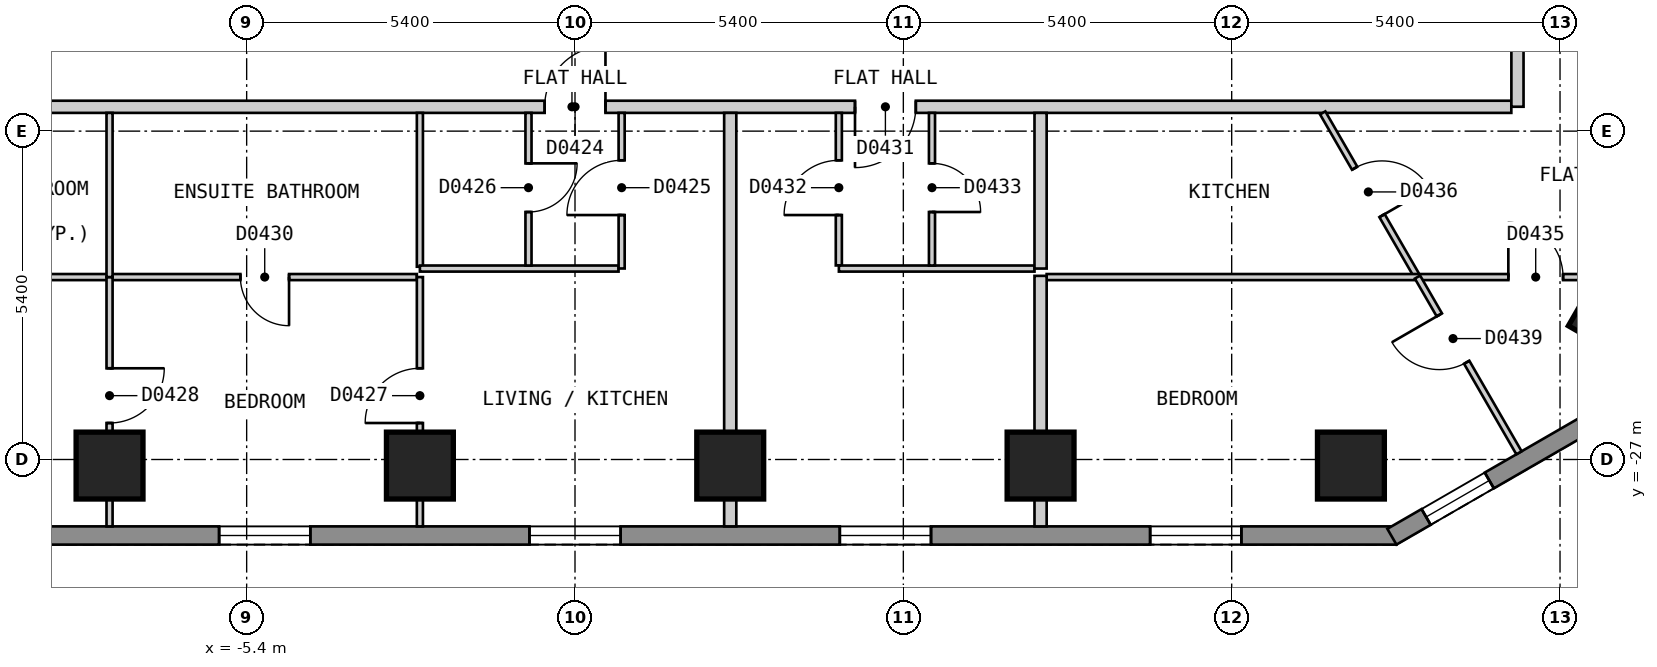
"""IFC4 building model, lengths in metres.
Left out: names, types, materials, properties, quantities, classifications, styles, units other than length and angle.
Written with IfcOpenShell. Run it as: python <this file> out.ifc"""

import sys

from ifc_helpers import new_model, si_unit, direction, frame, frame_2d, origin, origin_2d, place, context, subcontext, project, spatial, polyline, rectangle, outline, extrude, element, fill, save


model = new_model("IFC4")
c1 = context("Model", 3, precision=1e-05, world=origin(), true_north=direction((0.0, 1.0)))
c2 = subcontext(c1, "Body", "Model", "MODEL_VIEW")
j1 = project(units=[si_unit("LENGTHUNIT", "METRE"), si_unit("PLANEANGLEUNIT", "RADIAN")], contexts=[c1])
p1 = place(None, origin())
s1 = spatial("IfcSite", under=j1, at=p1, CompositionType="ELEMENT")
p2 = place(p1, origin())
s2 = spatial("IfcBuilding", under=s1, at=p2, CompositionType="ELEMENT")
p3 = place(p2, frame((0.0, 0.0, 38.4)))
s3 = spatial("IfcBuildingStorey", under=s2, at=p3, CompositionType="ELEMENT", Elevation=38.4)
for number, where, z_axis, x_axis in (
    (1, (-7.655, -27.1, 0.0), (0.0, 0.0, 1.0), (1.0, 0.0, 0.0)),
    (2, (-2.551, -27.1, 0.0), (0.0, 0.0, 1.0), (1.0, 0.0, 0.0)),
    (3, (2.553, -27.1, 0.0), (0.0, 0.0, 1.0), (1.0, 0.0, 0.0)),
    (4, (7.657, -27.1, 0.0), (0.0, 0.0, 1.0), (1.0, 0.0, 0.0)),
    (5, (12.761, -27.1, 0.0), (0.0, 0.0, 1.0), (1.0, 0.0, 0.0)),
    (6, (17.09, -24.6, 0.0), (0.0, 0.0, 1.0), (0.5, 0.866, 0.0)),
):
    element("IfcColumn", number, at=place(p3, frame(where, z_axis=z_axis, x_axis=x_axis)), inside=s3, PredefinedType="COLUMN", context=c2, shape_type="SweptSolid", body=[
        extrude(rectangle(XDim=1.1, YDim=1.1, at=origin_2d()), origin(), (0.0, 0.0, 1.0), 3.0),
    ])
p4 = place(p3, frame((-13.51, -28.25, 0.0), z_axis=(0.0, 0.0, 1.0), x_axis=(1.0, 0.0, 0.0)))
e7 = element("IfcWall", 7, at=p4, inside=s3, PredefinedType="SOLIDWALL", context=c2, shape_type="SweptSolid", body=[
    extrude(outline(polyline([(0.0, -0.15), (27.02, -0.15), (26.94, 0.15), (0.08, 0.15), (0.0, -0.15)])), origin(), (0.0, 0.0, 1.0), 2.7),
])
p5 = place(p4, frame((2.553, 0.0, 0.15)))
e8 = element("IfcOpeningElement", 8, at=p5, cuts=e7, PredefinedType="OPENING", context=c2, shape_type="SweptSolid", body=[
    extrude(rectangle(XDim=1.5, YDim=2.1, at=frame_2d((0.75, 1.05))), frame((0.0, 0.16, 0.0), z_axis=(0.0, -1.0, 0.0), x_axis=(1.0, 0.0, 0.0)), (0.0, 0.0, 1.0), 0.32),
])
p6 = place(p4, frame((7.657, 0.0, 0.15)))
e9 = element("IfcOpeningElement", 9, at=p6, cuts=e7, PredefinedType="OPENING", context=c2, shape_type="SweptSolid", body=[
    extrude(rectangle(XDim=1.5, YDim=2.1, at=frame_2d((0.75, 1.05))), frame((0.0, 0.16, 0.0), z_axis=(0.0, -1.0, 0.0), x_axis=(1.0, 0.0, 0.0)), (0.0, 0.0, 1.0), 0.32),
])
p7 = place(p4, frame((12.761, 0.0, 0.15)))
e10 = element("IfcOpeningElement", 10, at=p7, cuts=e7, PredefinedType="OPENING", context=c2, shape_type="SweptSolid", body=[
    extrude(rectangle(XDim=1.5, YDim=2.1, at=frame_2d((0.75, 1.05))), frame((0.0, 0.16, 0.0), z_axis=(0.0, -1.0, 0.0), x_axis=(1.0, 0.0, 0.0)), (0.0, 0.0, 1.0), 0.32),
])
p8 = place(p4, frame((17.865, 0.0, 0.15)))
e11 = element("IfcOpeningElement", 11, at=p8, cuts=e7, PredefinedType="OPENING", context=c2, shape_type="SweptSolid", body=[
    extrude(rectangle(XDim=1.5, YDim=2.1, at=frame_2d((0.75, 1.05))), frame((0.0, 0.16, 0.0), z_axis=(0.0, -1.0, 0.0), x_axis=(1.0, 0.0, 0.0)), (0.0, 0.0, 1.0), 0.32),
])
p9 = place(p4, frame((22.969, 0.0, 0.15)))
e12 = element("IfcOpeningElement", 12, at=p9, cuts=e7, PredefinedType="OPENING", context=c2, shape_type="SweptSolid", body=[
    extrude(rectangle(XDim=1.5, YDim=2.1, at=frame_2d((0.75, 1.05))), frame((0.0, 0.16, 0.0), z_axis=(0.0, -1.0, 0.0), x_axis=(1.0, 0.0, 0.0)), (0.0, 0.0, 1.0), 0.32),
])
p10 = place(p3, frame((13.435, -28.27, 0.0), z_axis=(0.0, 0.0, 1.0), x_axis=(0.866010750942, 0.50002537861, 0.0)))
e13 = element("IfcWall", 13, at=p10, inside=s3, PredefinedType="SOLIDWALL", context=c2, shape_type="SweptSolid", body=[
    extrude(outline(polyline([(0.0, -0.15), (5.0, -0.15), (4.919, 0.15), (0.08, 0.15), (0.0, -0.15)])), origin(), (0.0, 0.0, 1.0), 2.7),
])
p11 = place(p10, frame((0.65, 0.0, 0.15)))
e14 = element("IfcOpeningElement", 14, at=p11, cuts=e13, PredefinedType="OPENING", context=c2, shape_type="SweptSolid", body=[
    extrude(rectangle(XDim=1.2, YDim=2.1, at=frame_2d((0.6, 1.05))), frame((0.0, 0.16, 0.0), z_axis=(0.0, -1.0, 0.0), x_axis=(1.0, 0.0, 0.0)), (0.0, 0.0, 1.0), 0.32),
])
p12 = place(p3, frame((-15.499, -21.2, 0.0), z_axis=(0.0, 0.0, 1.0), x_axis=(1.0, 0.0, 0.0)))
e15 = element("IfcWall", 15, at=p12, inside=s3, PredefinedType="PARTITIONING", context=c2, shape_type="SweptSolid", body=[
    extrude(rectangle(XDim=30.898, YDim=0.2, at=frame_2d((15.449, 0.0))), origin(), (0.0, 0.0, 1.0), 2.7),
])
p13 = place(p12, frame((15.0, 0.0, 0.0)))
e16 = element("IfcOpeningElement", 16, at=p13, cuts=e15, PredefinedType="OPENING", context=c2, shape_type="SweptSolid", body=[
    extrude(rectangle(XDim=1.0, YDim=2.1, at=frame_2d((0.5, 1.05))), frame((0.0, 0.11, 0.0), z_axis=(0.0, -1.0, 0.0), x_axis=(1.0, 0.0, 0.0)), (0.0, 0.0, 1.0), 0.22),
])
p14 = place(p12, frame((20.104, 0.0, 0.0)))
e17 = element("IfcOpeningElement", 17, at=p14, cuts=e15, PredefinedType="OPENING", context=c2, shape_type="SweptSolid", body=[
    extrude(rectangle(XDim=1.0, YDim=2.1, at=frame_2d((0.5, 1.05))), frame((0.0, 0.11, 0.0), z_axis=(0.0, -1.0, 0.0), x_axis=(1.0, 0.0, 0.0)), (0.0, 0.0, 1.0), 0.22),
])
p15 = place(p3, frame((15.5, -21.199, 0.0), z_axis=(0.0, 0.0, 1.0), x_axis=(0.0, 1.0, 0.0)))
e18 = element("IfcWall", 18, at=p15, inside=s3, PredefinedType="PARTITIONING", context=c2, shape_type="SweptSolid", body=[
    extrude(rectangle(XDim=7.575, YDim=0.2, at=frame_2d((3.788, 0.0))), origin(), (0.0, 0.0, 1.0), 2.7),
])
p16 = place(p15, frame((1.188, 0.0, 0.0)))
e19 = element("IfcOpeningElement", 19, at=p16, cuts=e18, PredefinedType="OPENING", context=c2, shape_type="SweptSolid", body=[
    extrude(rectangle(XDim=1.0, YDim=2.1, at=frame_2d((0.5, 1.05))), frame((0.0, 0.11, 0.0), z_axis=(0.0, -1.0, 0.0), x_axis=(1.0, 0.0, 0.0)), (0.0, 0.0, 1.0), 0.22),
])
p17 = place(p3, frame((12.297, -21.3, 0.0), z_axis=(0.0, 0.0, 1.0), x_axis=(0.500004896655, -0.866022576681, 0.0)))
e20 = element("IfcWall", 20, at=p17, inside=s3, PredefinedType="PARTITIONING", context=c2, shape_type="SweptSolid", body=[
    extrude(rectangle(XDim=3.118, YDim=0.1, at=frame_2d((1.559, 0.0))), origin(), (0.0, 0.0, 1.0), 2.7),
])
p18 = place(p17, frame((1.051, 0.0, 0.0)))
e21 = element("IfcOpeningElement", 21, at=p18, cuts=e20, PredefinedType="OPENING", context=c2, shape_type="SweptSolid", body=[
    extrude(rectangle(XDim=0.9, YDim=2.1, at=frame_2d((0.45, 1.05))), frame((0.0, 0.06, 0.0), z_axis=(0.0, -1.0, 0.0), x_axis=(1.0, 0.0, 0.0)), (0.0, 0.0, 1.0), 0.12),
])
p19 = place(p3, frame((-2.551, -21.3, 0.0), z_axis=(0.0, 0.0, 1.0), x_axis=(0.0, -1.0, 0.0)))
e22 = element("IfcWall", 22, at=p19, inside=s3, PredefinedType="PARTITIONING", context=c2, shape_type="SweptSolid", body=[
    extrude(rectangle(XDim=2.53, YDim=0.1, at=frame_2d((1.265, 0.0))), origin(), (0.0, 0.0, 1.0), 2.7),
])
p20 = place(p3, frame((4.339, -21.3, 0.0), z_axis=(0.0, 0.0, 1.0), x_axis=(0.0, -1.0, 0.0)))
e23 = element("IfcWall", 23, at=p20, inside=s3, PredefinedType="PARTITIONING", context=c2, shape_type="SweptSolid", body=[
    extrude(rectangle(XDim=2.509, YDim=0.1, at=frame_2d((1.254, 0.0))), origin(), (0.0, 0.0, 1.0), 2.7),
])
p21 = place(p20, frame((0.78, 0.0, 0.0)))
e24 = element("IfcOpeningElement", 24, at=p21, cuts=e23, PredefinedType="OPENING", context=c2, shape_type="SweptSolid", body=[
    extrude(rectangle(XDim=0.9, YDim=2.1, at=frame_2d((0.45, 1.05))), frame((0.0, 0.06, 0.0), z_axis=(0.0, -1.0, 0.0), x_axis=(1.0, 0.0, 0.0)), (0.0, 0.0, 1.0), 0.12),
])
p22 = place(p3, frame((-2.551, -23.86, 0.0), z_axis=(0.0, 0.0, 1.0), x_axis=(1.0, 0.0, 0.0)))
e25 = element("IfcWall", 25, at=p22, inside=s3, PredefinedType="PARTITIONING", context=c2, shape_type="SweptSolid", body=[
    extrude(rectangle(XDim=3.267, YDim=0.1, at=frame_2d((1.634, 0.0))), origin(), (0.0, 0.0, 1.0), 2.7),
])
p23 = place(p3, frame((4.34, -23.86, 0.0), z_axis=(0.0, 0.0, 1.0), x_axis=(1.0, 0.0, 0.0)))
e26 = element("IfcWall", 26, at=p23, inside=s3, PredefinedType="PARTITIONING", context=c2, shape_type="SweptSolid", body=[
    extrude(rectangle(XDim=3.217, YDim=0.1, at=frame_2d((1.608, 0.0))), origin(), (0.0, 0.0, 1.0), 2.7),
])
p24 = place(p3, frame((-15.848, -24.0, 0.0), z_axis=(0.0, 0.0, 1.0), x_axis=(1.0, 0.0, 0.0)))
e27 = element("IfcWall", 27, at=p24, inside=s3, PredefinedType="PARTITIONING", context=c2, shape_type="SweptSolid", body=[
    extrude(rectangle(XDim=13.247, YDim=0.1, at=frame_2d((6.624, 0.0))), origin(), (0.0, 0.0, 1.0), 2.7),
])
p25 = place(p24, frame((3.596, 0.0, 0.0)))
e28 = element("IfcOpeningElement", 28, at=p25, cuts=e27, PredefinedType="OPENING", context=c2, shape_type="SweptSolid", body=[
    extrude(rectangle(XDim=0.8, YDim=2.1, at=frame_2d((0.4, 1.05))), frame((0.0, 0.06, 0.0), z_axis=(0.0, -1.0, 0.0), x_axis=(1.0, 0.0, 0.0)), (0.0, 0.0, 1.0), 0.12),
])
p26 = place(p24, frame((10.345, 0.0, 0.0)))
e29 = element("IfcOpeningElement", 29, at=p26, cuts=e27, PredefinedType="OPENING", context=c2, shape_type="SweptSolid", body=[
    extrude(rectangle(XDim=0.8, YDim=2.1, at=frame_2d((0.4, 1.05))), frame((0.0, 0.06, 0.0), z_axis=(0.0, -1.0, 0.0), x_axis=(1.0, 0.0, 0.0)), (0.0, 0.0, 1.0), 0.12),
])
p27 = place(p3, frame((7.757, -24.0, 0.0), z_axis=(0.0, 0.0, 1.0), x_axis=(1.0, 0.0, 0.0)))
e30 = element("IfcWall", 30, at=p27, inside=s3, PredefinedType="PARTITIONING", context=c2, shape_type="SweptSolid", body=[
    extrude(rectangle(XDim=10.493, YDim=0.1, at=frame_2d((5.247, 0.0))), origin(), (0.0, 0.0, 1.0), 2.7),
])
p28 = place(p27, frame((7.593, 0.0, 0.0)))
e31 = element("IfcOpeningElement", 31, at=p28, cuts=e30, PredefinedType="OPENING", context=c2, shape_type="SweptSolid", body=[
    extrude(rectangle(XDim=0.9, YDim=2.1, at=frame_2d((0.45, 1.05))), frame((0.0, 0.06, 0.0), z_axis=(0.0, -1.0, 0.0), x_axis=(1.0, 0.0, 0.0)), (0.0, 0.0, 1.0), 0.12),
])
p29 = place(p3, frame((5.871, -23.81, 0.0), z_axis=(0.0, 0.0, 1.0), x_axis=(0.0, 1.0, 0.0)))
e32 = element("IfcWall", 32, at=p29, inside=s3, PredefinedType="PARTITIONING", context=c2, shape_type="SweptSolid", body=[
    extrude(rectangle(XDim=2.51, YDim=0.1, at=frame_2d((1.255, 0.0))), origin(), (0.0, 0.0, 1.0), 2.7),
])
p30 = place(p29, frame((0.88, 0.0, 0.0)))
e33 = element("IfcOpeningElement", 33, at=p30, cuts=e32, PredefinedType="OPENING", context=c2, shape_type="SweptSolid", body=[
    extrude(rectangle(XDim=0.8, YDim=2.1, at=frame_2d((0.4, 1.05))), frame((0.0, 0.06, 0.0), z_axis=(0.0, -1.0, 0.0), x_axis=(1.0, 0.0, 0.0)), (0.0, 0.0, 1.0), 0.12),
])
p31 = place(p3, frame((0.767, -23.859, 0.0), z_axis=(0.0, 0.0, 1.0), x_axis=(0.0, 1.0, 0.0)))
e34 = element("IfcWall", 34, at=p31, inside=s3, PredefinedType="PARTITIONING", context=c2, shape_type="SweptSolid", body=[
    extrude(rectangle(XDim=2.559, YDim=0.1, at=frame_2d((1.279, 0.0))), origin(), (0.0, 0.0, 1.0), 2.7),
])
p32 = place(p31, frame((0.879, 0.0, 0.0)))
e35 = element("IfcOpeningElement", 35, at=p32, cuts=e34, PredefinedType="OPENING", context=c2, shape_type="SweptSolid", body=[
    extrude(rectangle(XDim=0.9, YDim=2.1, at=frame_2d((0.45, 1.05))), frame((0.0, 0.06, 0.0), z_axis=(0.0, -1.0, 0.0), x_axis=(1.0, 0.0, 0.0)), (0.0, 0.0, 1.0), 0.12),
])
p33 = place(p3, frame((-0.765, -23.81, 0.0), z_axis=(0.0, 0.0, 1.0), x_axis=(0.0, 1.0, 0.0)))
e36 = element("IfcWall", 36, at=p33, inside=s3, PredefinedType="PARTITIONING", context=c2, shape_type="SweptSolid", body=[
    extrude(rectangle(XDim=2.51, YDim=0.1, at=frame_2d((1.255, 0.0))), origin(), (0.0, 0.0, 1.0), 2.7),
])
p34 = place(p33, frame((0.88, 0.0, 0.0)))
e37 = element("IfcOpeningElement", 37, at=p34, cuts=e36, PredefinedType="OPENING", context=c2, shape_type="SweptSolid", body=[
    extrude(rectangle(XDim=0.8, YDim=2.1, at=frame_2d((0.4, 1.05))), frame((0.0, 0.06, 0.0), z_axis=(0.0, -1.0, 0.0), x_axis=(1.0, 0.0, 0.0)), (0.0, 0.0, 1.0), 0.12),
])
p35 = place(p3, frame((-7.655, -28.1, 0.0), z_axis=(0.0, 0.0, 1.0), x_axis=(0.0, 1.0, 0.0)))
e38 = element("IfcWall", 38, at=p35, inside=s3, PredefinedType="PARTITIONING", context=c2, shape_type="SweptSolid", body=[
    extrude(rectangle(XDim=4.1, YDim=0.1, at=frame_2d((2.05, 0.0))), origin(), (0.0, 0.0, 1.0), 2.7),
])
p36 = place(p35, frame((1.7, 0.0, 0.0)))
e39 = element("IfcOpeningElement", 39, at=p36, cuts=e38, PredefinedType="OPENING", context=c2, shape_type="SweptSolid", body=[
    extrude(rectangle(XDim=0.9, YDim=2.1, at=frame_2d((0.45, 1.05))), frame((0.0, 0.06, 0.0), z_axis=(0.0, -1.0, 0.0), x_axis=(1.0, 0.0, 0.0)), (0.0, 0.0, 1.0), 0.12),
])
p37 = place(p3, frame((-2.551, -28.1, 0.0), z_axis=(0.0, 0.0, 1.0), x_axis=(0.0, 1.0, 0.0)))
e40 = element("IfcWall", 40, at=p37, inside=s3, PredefinedType="PARTITIONING", context=c2, shape_type="SweptSolid", body=[
    extrude(rectangle(XDim=4.1, YDim=0.1, at=frame_2d((2.05, 0.0))), origin(), (0.0, 0.0, 1.0), 2.7),
])
p38 = place(p37, frame((1.7, 0.0, 0.0)))
e41 = element("IfcOpeningElement", 41, at=p38, cuts=e40, PredefinedType="OPENING", context=c2, shape_type="SweptSolid", body=[
    extrude(rectangle(XDim=0.9, YDim=2.1, at=frame_2d((0.45, 1.05))), frame((0.0, 0.06, 0.0), z_axis=(0.0, -1.0, 0.0), x_axis=(1.0, 0.0, 0.0)), (0.0, 0.0, 1.0), 0.12),
])
p39 = place(p3, frame((2.553, -21.3, 0.0), z_axis=(0.0, 0.0, 1.0), x_axis=(0.0, -1.0, 0.0)))
e42 = element("IfcWall", 42, at=p39, inside=s3, PredefinedType="PARTITIONING", context=c2, shape_type="SweptSolid", body=[
    extrude(rectangle(XDim=6.8, YDim=0.2, at=frame_2d((3.4, 0.0))), origin(), (0.0, 0.0, 1.0), 2.7),
])
p40 = place(p3, frame((7.657, -28.1, 0.0), z_axis=(0.0, 0.0, 1.0), x_axis=(0.0, 1.0, 0.0)))
e43 = element("IfcWall", 43, at=p40, inside=s3, PredefinedType="PARTITIONING", context=c2, shape_type="SweptSolid", body=[
    extrude(rectangle(XDim=4.12, YDim=0.2, at=frame_2d((2.06, 0.0))), origin(), (0.0, 0.0, 1.0), 2.7),
])
p41 = place(p3, frame((7.657, -23.86, 0.0), z_axis=(0.0, 0.0, 1.0), x_axis=(0.0, 1.0, 0.0)))
e44 = element("IfcWall", 44, at=p41, inside=s3, PredefinedType="PARTITIONING", context=c2, shape_type="SweptSolid", body=[
    extrude(rectangle(XDim=2.56, YDim=0.2, at=frame_2d((1.28, 0.0))), origin(), (0.0, 0.0, 1.0), 2.7),
])
p42 = place(p3, frame((13.856, -24.0, 0.0), z_axis=(0.0, 0.0, 1.0), x_axis=(0.50010451262, -0.865965054986, 0.0)))
e45 = element("IfcWall", 45, at=p42, inside=s3, PredefinedType="PARTITIONING", context=c2, shape_type="SweptSolid", body=[
    extrude(rectangle(XDim=3.337, YDim=0.1, at=frame_2d((1.668, 0.0))), origin(), (0.0, 0.0, 1.0), 2.7),
])
p43 = place(p42, frame((0.718, 0.0, 0.0)))
e46 = element("IfcOpeningElement", 46, at=p43, cuts=e45, PredefinedType="OPENING", context=c2, shape_type="SweptSolid", body=[
    extrude(rectangle(XDim=0.9, YDim=2.1, at=frame_2d((0.45, 1.05))), frame((0.0, 0.06, 0.0), z_axis=(0.0, -1.0, 0.0), x_axis=(1.0, 0.0, 0.0)), (0.0, 0.0, 1.0), 0.12),
])
p44 = place(p3, frame((-7.655, -24.0, 0.0), z_axis=(0.0, 0.0, 1.0), x_axis=(0.0, 1.0, 0.0)))
e47 = element("IfcWall", 47, at=p44, inside=s3, PredefinedType="PARTITIONING", context=c2, shape_type="SweptSolid", body=[
    extrude(rectangle(XDim=2.7, YDim=0.1, at=frame_2d((1.35, 0.0))), origin(), (0.0, 0.0, 1.0), 2.7),
])
p45 = place(p6, origin())
e48 = element("IfcWindow", 48, at=p45, inside=s3, PartitioningType="SINGLE_PANEL", PredefinedType="WINDOW", context=c2, shape_type="SweptSolid", body=[
    extrude(rectangle(XDim=1.5, YDim=2.1, at=frame_2d((0.75, 1.05))), frame((0.0, 0.03, 0.0), z_axis=(0.0, -1.0, 0.0), x_axis=(1.0, 0.0, 0.0)), (0.0, 0.0, 1.0), 0.06),
])
fill(e9, e48)
p46 = place(p7, origin())
e49 = element("IfcWindow", 49, at=p46, inside=s3, PartitioningType="SINGLE_PANEL", PredefinedType="WINDOW", context=c2, shape_type="SweptSolid", body=[
    extrude(rectangle(XDim=1.5, YDim=2.1, at=frame_2d((0.75, 1.05))), frame((0.0, 0.03, 0.0), z_axis=(0.0, -1.0, 0.0), x_axis=(1.0, 0.0, 0.0)), (0.0, 0.0, 1.0), 0.06),
])
fill(e10, e49)
p47 = place(p8, origin())
e50 = element("IfcWindow", 50, at=p47, inside=s3, PartitioningType="SINGLE_PANEL", PredefinedType="WINDOW", context=c2, shape_type="SweptSolid", body=[
    extrude(rectangle(XDim=1.5, YDim=2.1, at=frame_2d((0.75, 1.05))), frame((0.0, 0.03, 0.0), z_axis=(0.0, -1.0, 0.0), x_axis=(1.0, 0.0, 0.0)), (0.0, 0.0, 1.0), 0.06),
])
fill(e11, e50)
p48 = place(p9, origin())
e51 = element("IfcWindow", 51, at=p48, inside=s3, PartitioningType="SINGLE_PANEL", PredefinedType="WINDOW", context=c2, shape_type="SweptSolid", body=[
    extrude(rectangle(XDim=1.5, YDim=2.1, at=frame_2d((0.75, 1.05))), frame((0.0, 0.03, 0.0), z_axis=(0.0, -1.0, 0.0), x_axis=(1.0, 0.0, 0.0)), (0.0, 0.0, 1.0), 0.06),
])
fill(e12, e51)
p49 = place(p11, origin())
e52 = element("IfcWindow", 52, at=p49, inside=s3, PartitioningType="SINGLE_PANEL", PredefinedType="WINDOW", context=c2, shape_type="SweptSolid", body=[
    extrude(rectangle(XDim=1.2, YDim=2.1, at=frame_2d((0.6, 1.05))), frame((0.0, 0.03, 0.0), z_axis=(0.0, -1.0, 0.0), x_axis=(1.0, 0.0, 0.0)), (0.0, 0.0, 1.0), 0.06),
])
fill(e14, e52)
p50 = place(p13, origin())
e53 = element("IfcDoor", 53, at=p50, inside=s3, OperationType="SINGLE_SWING_RIGHT", PredefinedType="DOOR", context=c2, shape_type="SweptSolid", body=[
    extrude(rectangle(XDim=1.0, YDim=2.1, at=frame_2d((0.5, 1.05))), frame((0.0, 0.025, 0.0), z_axis=(0.0, -1.0, 0.0), x_axis=(1.0, 0.0, 0.0)), (0.0, 0.0, 1.0), 0.05),
])
fill(e16, e53)
p51 = place(p32, origin())
e54 = element("IfcDoor", 54, at=p51, inside=s3, OperationType="SINGLE_SWING_LEFT", PredefinedType="DOOR", context=c2, shape_type="SweptSolid", body=[
    extrude(rectangle(XDim=0.9, YDim=2.1, at=frame_2d((0.45, 1.05))), frame((0.0, 0.025, 0.0), z_axis=(0.0, -1.0, 0.0), x_axis=(1.0, 0.0, 0.0)), (0.0, 0.0, 1.0), 0.05),
])
fill(e35, e54)
p52 = place(p34, origin())
e55 = element("IfcDoor", 55, at=p52, inside=s3, OperationType="SINGLE_SWING_RIGHT", PredefinedType="DOOR", context=c2, shape_type="SweptSolid", body=[
    extrude(rectangle(XDim=0.8, YDim=2.1, at=frame_2d((0.4, 1.05))), frame((0.0, 0.025, 0.0), z_axis=(0.0, -1.0, 0.0), x_axis=(1.0, 0.0, 0.0)), (0.0, 0.0, 1.0), 0.05),
])
fill(e37, e55)
p53 = place(p38, origin())
e56 = element("IfcDoor", 56, at=p53, inside=s3, OperationType="SINGLE_SWING_LEFT", PredefinedType="DOOR", context=c2, shape_type="SweptSolid", body=[
    extrude(rectangle(XDim=0.9, YDim=2.1, at=frame_2d((0.45, 1.05))), frame((0.0, 0.025, 0.0), z_axis=(0.0, -1.0, 0.0), x_axis=(1.0, 0.0, 0.0)), (0.0, 0.0, 1.0), 0.05),
])
fill(e41, e56)
p54 = place(p36, origin())
e57 = element("IfcDoor", 57, at=p54, inside=s3, OperationType="SINGLE_SWING_RIGHT", PredefinedType="DOOR", context=c2, shape_type="SweptSolid", body=[
    extrude(rectangle(XDim=0.9, YDim=2.1, at=frame_2d((0.45, 1.05))), frame((0.0, 0.025, 0.0), z_axis=(0.0, -1.0, 0.0), x_axis=(1.0, 0.0, 0.0)), (0.0, 0.0, 1.0), 0.05),
])
fill(e39, e57)
p55 = place(p26, origin())
e58 = element("IfcDoor", 58, at=p55, inside=s3, OperationType="SINGLE_SWING_RIGHT", PredefinedType="DOOR", context=c2, shape_type="SweptSolid", body=[
    extrude(rectangle(XDim=0.8, YDim=2.1, at=frame_2d((0.4, 1.05))), frame((0.0, 0.025, 0.0), z_axis=(0.0, -1.0, 0.0), x_axis=(1.0, 0.0, 0.0)), (0.0, 0.0, 1.0), 0.05),
])
fill(e29, e58)
p56 = place(p14, origin())
e59 = element("IfcDoor", 59, at=p56, inside=s3, OperationType="SINGLE_SWING_LEFT", PredefinedType="DOOR", context=c2, shape_type="SweptSolid", body=[
    extrude(rectangle(XDim=1.0, YDim=2.1, at=frame_2d((0.5, 1.05))), frame((0.0, 0.025, 0.0), z_axis=(0.0, -1.0, 0.0), x_axis=(1.0, 0.0, 0.0)), (0.0, 0.0, 1.0), 0.05),
])
fill(e17, e59)
p57 = place(p21, origin())
e60 = element("IfcDoor", 60, at=p57, inside=s3, OperationType="SINGLE_SWING_RIGHT", PredefinedType="DOOR", context=c2, shape_type="SweptSolid", body=[
    extrude(rectangle(XDim=0.9, YDim=2.1, at=frame_2d((0.45, 1.05))), frame((0.0, 0.025, 0.0), z_axis=(0.0, -1.0, 0.0), x_axis=(1.0, 0.0, 0.0)), (0.0, 0.0, 1.0), 0.05),
])
fill(e24, e60)
p58 = place(p30, origin())
e61 = element("IfcDoor", 61, at=p58, inside=s3, OperationType="SINGLE_SWING_LEFT", PredefinedType="DOOR", context=c2, shape_type="SweptSolid", body=[
    extrude(rectangle(XDim=0.8, YDim=2.1, at=frame_2d((0.4, 1.05))), frame((0.0, 0.025, 0.0), z_axis=(0.0, -1.0, 0.0), x_axis=(1.0, 0.0, 0.0)), (0.0, 0.0, 1.0), 0.05),
])
fill(e33, e61)
p59 = place(p28, origin())
e62 = element("IfcDoor", 62, at=p59, inside=s3, OperationType="SINGLE_SWING_LEFT", PredefinedType="DOOR", context=c2, shape_type="SweptSolid", body=[
    extrude(rectangle(XDim=0.9, YDim=2.1, at=frame_2d((0.45, 1.05))), frame((0.0, 0.025, 0.0), z_axis=(0.0, -1.0, 0.0), x_axis=(1.0, 0.0, 0.0)), (0.0, 0.0, 1.0), 0.05),
])
fill(e31, e62)
p60 = place(p18, origin())
e63 = element("IfcDoor", 63, at=p60, inside=s3, OperationType="SINGLE_SWING_RIGHT", PredefinedType="DOOR", context=c2, shape_type="SweptSolid", body=[
    extrude(rectangle(XDim=0.9, YDim=2.1, at=frame_2d((0.45, 1.05))), frame((0.0, 0.025, 0.0), z_axis=(0.0, -1.0, 0.0), x_axis=(1.0, 0.0, 0.0)), (0.0, 0.0, 1.0), 0.05),
])
fill(e21, e63)
p61 = place(p43, origin())
e64 = element("IfcDoor", 64, at=p61, inside=s3, OperationType="SINGLE_SWING_LEFT", PredefinedType="DOOR", context=c2, shape_type="SweptSolid", body=[
    extrude(rectangle(XDim=0.9, YDim=2.1, at=frame_2d((0.45, 1.05))), frame((0.0, 0.025, 0.0), z_axis=(0.0, -1.0, 0.0), x_axis=(1.0, 0.0, 0.0)), (0.0, 0.0, 1.0), 0.05),
])
fill(e46, e64)
save(model, sys.argv[1])
